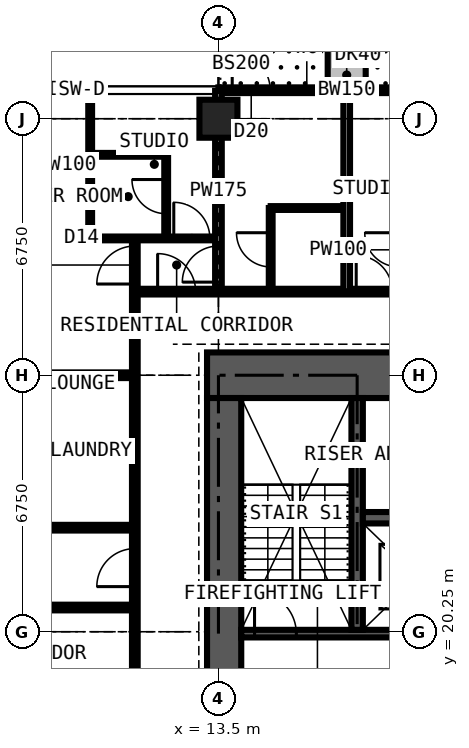
"""IFC4 building model, lengths in metres.
Left out: names, types, materials, properties, quantities, classifications, styles, units other than length and angle.
Written with IfcOpenShell. Run it as: python <this file> out.ifc"""

import sys

from ifc_helpers import new_model, si_unit, direction, frame, frame_2d, origin, origin_2d, place, context, subcontext, project, spatial, rectangle, extrude, element, fill, save


model = new_model("IFC4")
c1 = context("Model", 3, precision=1e-05, world=origin(), true_north=direction((0.0, 1.0)))
c2 = subcontext(c1, "Body", "Model", "MODEL_VIEW")
j1 = project(units=[si_unit("LENGTHUNIT", "METRE"), si_unit("PLANEANGLEUNIT", "RADIAN")], contexts=[c1])
p1 = place(None, origin())
s1 = spatial("IfcSite", under=j1, at=p1, CompositionType="ELEMENT")
p2 = place(p1, origin())
s2 = spatial("IfcBuilding", under=s1, at=p2, CompositionType="ELEMENT")
p3 = place(p2, frame((0.0, 0.0, 233.1)))
s3 = spatial("IfcBuildingStorey", under=s2, at=p3, CompositionType="ELEMENT", Elevation=233.1)
p4 = place(p3, frame((13.5, 33.75, 0.0), z_axis=(0.0, 0.0, 1.0), x_axis=(1.0, 0.0, 0.0)))
e1 = element("IfcColumn", 1, at=p4, inside=s3, PredefinedType="COLUMN", context=c2, shape_type="SweptSolid", body=[
    extrude(rectangle(XDim=1.0, YDim=1.0, at=origin_2d()), origin(), (0.0, 0.0, 1.0), 3.6),
])
p5 = place(p3, frame((27.3, 27.0, 0.0), z_axis=(0.0, 0.0, 1.0), x_axis=(-1.0, 0.0, 0.0)))
e2 = element("IfcWall", 2, at=p5, inside=s3, PredefinedType="SHEAR", context=c2, shape_type="SweptSolid", body=[
    extrude(rectangle(XDim=14.1, YDim=1.2, at=frame_2d((7.05, 0.0))), origin(), (0.0, 0.0, 1.0), 3.6),
])
p6 = place(p5, frame((4.55, 0.0, 0.0)))
e3 = element("IfcOpeningElement", 3, at=p6, cuts=e2, PredefinedType="OPENING", context=c2, shape_type="SweptSolid", body=[
    extrude(rectangle(XDim=0.9, YDim=2.2, at=frame_2d((0.45, 1.1))), frame((0.0, 0.61, 0.0), z_axis=(0.0, -1.0, 0.0), x_axis=(1.0, 0.0, 0.0)), (0.0, 0.0, 1.0), 1.22),
])
p7 = place(p5, frame((7.525, 0.0, 0.0)))
e4 = element("IfcOpeningElement", 4, at=p7, cuts=e2, PredefinedType="OPENING", context=c2, shape_type="SweptSolid", body=[
    extrude(rectangle(XDim=1.0, YDim=2.2, at=frame_2d((0.5, 1.1))), frame((0.0, 0.61, 0.0), z_axis=(0.0, -1.0, 0.0), x_axis=(1.0, 0.0, 0.0)), (0.0, 0.0, 1.0), 1.22),
])
p8 = place(p3, frame((13.65, 26.4, 0.0), z_axis=(0.0, 0.0, 1.0), x_axis=(0.0, -1.0, 0.0)))
e5 = element("IfcWall", 5, at=p8, inside=s3, PredefinedType="SHEAR", context=c2, shape_type="SweptSolid", body=[
    extrude(rectangle(XDim=12.3, YDim=0.9, at=frame_2d((6.15, 0.0))), origin(), (0.0, 0.0, 1.0), 3.6),
])
p9 = place(p8, frame((7.45, 0.0, 0.0)))
e6 = element("IfcOpeningElement", 6, at=p9, cuts=e5, PredefinedType="OPENING", context=c2, shape_type="SweptSolid", body=[
    extrude(rectangle(XDim=1.2, YDim=2.2, at=frame_2d((0.6, 1.1))), frame((0.0, 0.46, 0.0), z_axis=(0.0, -1.0, 0.0), x_axis=(1.0, 0.0, 0.0)), (0.0, 0.0, 1.0), 0.92),
])
p10 = place(p3, frame((13.5, 34.5, 0.0), z_axis=(0.0, 0.0, 1.0), x_axis=(1.0, 0.0, 0.0)))
e7 = element("IfcWall", 7, at=p10, inside=s3, PredefinedType="SOLIDWALL", context=c2, shape_type="SweptSolid", body=[
    extrude(rectangle(XDim=6.75, YDim=0.15, at=frame_2d((3.375, 0.0))), origin(), (0.0, 0.0, 1.0), 3.375),
])
p11 = place(p10, frame((0.363, 0.0, 0.0)))
e8 = element("IfcOpeningElement", 8, at=p11, cuts=e7, PredefinedType="OPENING", context=c2, shape_type="SweptSolid", body=[
    extrude(rectangle(XDim=1.0, YDim=2.2, at=frame_2d((0.5, 1.1))), frame((0.0, 0.085, 0.0), z_axis=(0.0, -1.0, 0.0), x_axis=(1.0, 0.0, 0.0)), (0.0, 0.0, 1.0), 0.17),
])
p12 = place(p10, frame((1.725, 0.0, 0.9)))
e9 = element("IfcOpeningElement", 9, at=p12, cuts=e7, PredefinedType="OPENING", context=c2, shape_type="SweptSolid", body=[
    extrude(rectangle(XDim=1.2, YDim=1.8, at=frame_2d((0.6, 0.9))), frame((0.0, 0.085, 0.0), z_axis=(0.0, -1.0, 0.0), x_axis=(1.0, 0.0, 0.0)), (0.0, 0.0, 1.0), 0.17),
])
p13 = place(p10, frame((5.387, 0.0, 0.0)))
e10 = element("IfcOpeningElement", 10, at=p13, cuts=e7, PredefinedType="OPENING", context=c2, shape_type="SweptSolid", body=[
    extrude(rectangle(XDim=1.0, YDim=2.2, at=frame_2d((0.5, 1.1))), frame((0.0, 0.085, 0.0), z_axis=(0.0, -1.0, 0.0), x_axis=(1.0, 0.0, 0.0)), (0.0, 0.0, 1.0), 0.17),
])
p14 = place(p10, frame((3.825, 0.0, 0.9)))
e11 = element("IfcOpeningElement", 11, at=p14, cuts=e7, PredefinedType="OPENING", context=c2, shape_type="SweptSolid", body=[
    extrude(rectangle(XDim=1.2, YDim=1.8, at=frame_2d((0.6, 0.9))), frame((0.0, 0.085, 0.0), z_axis=(0.0, -1.0, 0.0), x_axis=(1.0, 0.0, 0.0)), (0.0, 0.0, 1.0), 0.17),
])
p15 = place(p3, frame((16.875, 34.6, 0.0), z_axis=(0.0, 0.0, 1.0), x_axis=(0.0, 1.0, 0.0)))
e12 = element("IfcWall", 12, at=p15, inside=s3, PredefinedType="USERDEFINED", context=c2, shape_type="SweptSolid", body=[
    extrude(rectangle(XDim=2.2, YDim=1.0, at=frame_2d((1.1, 0.0))), origin(), (0.0, 0.0, 1.0), 0.9),
])
p16 = place(p3, frame((14.1, 20.2, 0.0), z_axis=(0.0, 0.0, 1.0), x_axis=(1.0, 0.0, 0.0)))
e13 = element("IfcWall", 13, at=p16, inside=s3, PredefinedType="SHEAR", context=c2, shape_type="SweptSolid", body=[
    extrude(rectangle(XDim=12.3, YDim=0.2, at=frame_2d((6.15, 0.0))), origin(), (0.0, 0.0, 1.0), 3.6),
])
p17 = place(p16, frame((4.56, 0.0, 0.0)))
e14 = element("IfcOpeningElement", 14, at=p17, cuts=e13, PredefinedType="OPENING", context=c2, shape_type="SweptSolid", body=[
    extrude(rectangle(XDim=1.1, YDim=2.2, at=frame_2d((0.55, 1.1))), frame((0.0, 0.11, 0.0), z_axis=(0.0, -1.0, 0.0), x_axis=(1.0, 0.0, 0.0)), (0.0, 0.0, 1.0), 0.22),
])
p18 = place(p16, frame((6.7, 0.0, 0.0)))
e15 = element("IfcOpeningElement", 15, at=p18, cuts=e13, PredefinedType="OPENING", context=c2, shape_type="SweptSolid", body=[
    extrude(rectangle(XDim=1.1, YDim=2.2, at=frame_2d((0.55, 1.1))), frame((0.0, 0.11, 0.0), z_axis=(0.0, -1.0, 0.0), x_axis=(1.0, 0.0, 0.0)), (0.0, 0.0, 1.0), 0.22),
])
p19 = place(p16, frame((0.35, 0.0, 0.0)))
e16 = element("IfcOpeningElement", 16, at=p19, cuts=e13, PredefinedType="OPENING", context=c2, shape_type="SweptSolid", body=[
    extrude(rectangle(XDim=1.1, YDim=2.2, at=frame_2d((0.55, 1.1))), frame((0.0, 0.11, 0.0), z_axis=(0.0, -1.0, 0.0), x_axis=(1.0, 0.0, 0.0)), (0.0, 0.0, 1.0), 0.22),
])
p20 = place(p16, frame((9.75, 0.0, 0.0)))
e17 = element("IfcOpeningElement", 17, at=p20, cuts=e13, PredefinedType="OPENING", context=c2, shape_type="SweptSolid", body=[
    extrude(rectangle(XDim=1.1, YDim=2.2, at=frame_2d((0.55, 1.1))), frame((0.0, 0.11, 0.0), z_axis=(0.0, -1.0, 0.0), x_axis=(1.0, 0.0, 0.0)), (0.0, 0.0, 1.0), 0.22),
])
p21 = place(p3, frame((17.15, 20.3, 0.0), z_axis=(0.0, 0.0, 1.0), x_axis=(0.0, 1.0, 0.0)))
e18 = element("IfcWall", 18, at=p21, inside=s3, PredefinedType="SHEAR", context=c2, shape_type="SweptSolid", body=[
    extrude(rectangle(XDim=6.1, YDim=0.3, at=frame_2d((3.05, 0.0))), origin(), (0.0, 0.0, 1.0), 3.6),
])
p22 = place(p3, frame((17.3, 23.25, 0.0), z_axis=(0.0, 0.0, 1.0), x_axis=(1.0, 0.0, 0.0)))
e19 = element("IfcWall", 19, at=p22, inside=s3, PredefinedType="SHEAR", context=c2, shape_type="SweptSolid", body=[
    extrude(rectangle(XDim=5.9, YDim=0.3, at=frame_2d((2.95, 0.0))), origin(), (0.0, 0.0, 1.0), 3.6),
])
p23 = place(p3, frame((4.15, 27.0, 0.0), z_axis=(0.0, 0.0, 1.0), x_axis=(1.0, 0.0, 0.0)))
e20 = element("IfcWall", 20, at=p23, inside=s3, PredefinedType="PARTITIONING", context=c2, shape_type="SweptSolid", body=[
    extrude(rectangle(XDim=7.15, YDim=0.15, at=frame_2d((3.575, 0.0))), origin(), (0.0, 0.0, 1.0), 2.877),
])
p24 = place(p3, frame((5.65, 20.887, 0.0), z_axis=(0.0, 0.0, 1.0), x_axis=(1.0, 0.0, 0.0)))
e21 = element("IfcWall", 21, at=p24, inside=s3, PredefinedType="PARTITIONING", context=c2, shape_type="SweptSolid", body=[
    extrude(rectangle(XDim=5.65, YDim=0.15, at=frame_2d((2.825, 0.0))), origin(), (0.0, 0.0, 1.0), 3.375),
])
p25 = place(p3, frame((5.65, 22.988, 0.0), z_axis=(0.0, 0.0, 1.0), x_axis=(1.0, 0.0, 0.0)))
e22 = element("IfcWall", 22, at=p25, inside=s3, PredefinedType="PARTITIONING", context=c2, shape_type="SweptSolid", body=[
    extrude(rectangle(XDim=5.65, YDim=0.15, at=frame_2d((2.825, 0.0))), origin(), (0.0, 0.0, 1.0), 3.375),
])
p26 = place(p25, frame((2.35, 0.0, 0.0)))
e23 = element("IfcOpeningElement", 23, at=p26, cuts=e22, PredefinedType="OPENING", context=c2, shape_type="SweptSolid", body=[
    extrude(rectangle(XDim=0.95, YDim=2.2, at=frame_2d((0.475, 1.1))), frame((0.0, 0.085, 0.0), z_axis=(0.0, -1.0, 0.0), x_axis=(1.0, 0.0, 0.0)), (0.0, 0.0, 1.0), 0.17),
])
p27 = place(p3, frame((10.125, 30.6, 0.0), z_axis=(0.0, 0.0, 1.0), x_axis=(0.0, 1.0, 0.0)))
e24 = element("IfcWall", 24, at=p27, inside=s3, PredefinedType="PARTITIONING", context=c2, shape_type="SweptSolid", body=[
    extrude(rectangle(XDim=3.884, YDim=0.1, at=frame_2d((1.942, 0.0))), origin(), (0.0, 0.0, 1.0), 3.375),
])
p28 = place(p3, frame((10.125, 30.6, 0.0), z_axis=(0.0, 0.0, 1.0), x_axis=(1.0, 0.0, 0.0)))
e25 = element("IfcWall", 25, at=p28, inside=s3, PredefinedType="PARTITIONING", context=c2, shape_type="SweptSolid", body=[
    extrude(rectangle(XDim=3.375, YDim=0.1, at=frame_2d((1.688, 0.0))), origin(), (0.0, 0.0, 1.0), 3.375),
])
p29 = place(p28, frame((2.2, 0.0, 0.0)))
e26 = element("IfcOpeningElement", 26, at=p29, cuts=e25, PredefinedType="OPENING", context=c2, shape_type="SweptSolid", body=[
    extrude(rectangle(XDim=0.95, YDim=2.2, at=frame_2d((0.475, 1.1))), frame((0.0, 0.06, 0.0), z_axis=(0.0, -1.0, 0.0), x_axis=(1.0, 0.0, 0.0)), (0.0, 0.0, 1.0), 0.12),
])
p30 = place(p3, frame((10.125, 32.8, 0.0), z_axis=(0.0, 0.0, 1.0), x_axis=(1.0, 0.0, 0.0)))
e27 = element("IfcWall", 27, at=p30, inside=s3, PredefinedType="PARTITIONING", context=c2, shape_type="SweptSolid", body=[
    extrude(rectangle(XDim=2.0, YDim=0.1, at=frame_2d((1.0, 0.0))), origin(), (0.0, 0.0, 1.0), 3.375),
])
p31 = place(p3, frame((11.3, 11.3, 0.0), z_axis=(0.0, 0.0, 1.0), x_axis=(0.0, 1.0, 0.0)))
e28 = element("IfcWall", 28, at=p31, inside=s3, PredefinedType="PARTITIONING", context=c2, shape_type="SweptSolid", body=[
    extrude(rectangle(XDim=19.3, YDim=0.15, at=frame_2d((9.65, 0.0))), origin(), (0.0, 0.0, 1.0), 3.375),
])
p32 = place(p31, frame((18.1, 0.0, 0.0)))
e29 = element("IfcOpeningElement", 29, at=p32, cuts=e28, PredefinedType="OPENING", context=c2, shape_type="SweptSolid", body=[
    extrude(rectangle(XDim=1.0, YDim=2.2, at=frame_2d((0.5, 1.1))), frame((0.0, 0.085, 0.0), z_axis=(0.0, -1.0, 0.0), x_axis=(1.0, 0.0, 0.0)), (0.0, 0.0, 1.0), 0.17),
])
p33 = place(p31, frame((10.137, 0.0, 0.0)))
e30 = element("IfcOpeningElement", 30, at=p33, cuts=e28, PredefinedType="OPENING", context=c2, shape_type="SweptSolid", body=[
    extrude(rectangle(XDim=1.0, YDim=2.2, at=frame_2d((0.5, 1.1))), frame((0.0, 0.085, 0.0), z_axis=(0.0, -1.0, 0.0), x_axis=(1.0, 0.0, 0.0)), (0.0, 0.0, 1.0), 0.17),
])
p34 = place(p3, frame((11.3, 29.2, 0.0), z_axis=(0.0, 0.0, 1.0), x_axis=(1.0, 0.0, 0.0)))
e31 = element("IfcWall", 31, at=p34, inside=s3, PredefinedType="PARTITIONING", context=c2, shape_type="SweptSolid", body=[
    extrude(rectangle(XDim=19.809, YDim=0.15, at=frame_2d((9.904, 0.0))), origin(), (0.0, 0.0, 1.0), 3.375),
])
p35 = place(p34, frame((16.3, 0.0, 0.0)))
e32 = element("IfcOpeningElement", 32, at=p35, cuts=e31, PredefinedType="OPENING", context=c2, shape_type="SweptSolid", body=[
    extrude(rectangle(XDim=1.0, YDim=2.2, at=frame_2d((0.5, 1.1))), frame((0.0, 0.085, 0.0), z_axis=(0.0, -1.0, 0.0), x_axis=(1.0, 0.0, 0.0)), (0.0, 0.0, 1.0), 0.17),
])
p36 = place(p34, frame((5.825, 0.0, 0.0)))
e33 = element("IfcOpeningElement", 33, at=p36, cuts=e31, PredefinedType="OPENING", context=c2, shape_type="SweptSolid", body=[
    extrude(rectangle(XDim=0.95, YDim=2.2, at=frame_2d((0.475, 1.1))), frame((0.0, 0.085, 0.0), z_axis=(0.0, -1.0, 0.0), x_axis=(1.0, 0.0, 0.0)), (0.0, 0.0, 1.0), 0.17),
])
p37 = place(p34, frame((9.2, 0.0, 0.0)))
e34 = element("IfcOpeningElement", 34, at=p37, cuts=e31, PredefinedType="OPENING", context=c2, shape_type="SweptSolid", body=[
    extrude(rectangle(XDim=0.95, YDim=2.2, at=frame_2d((0.475, 1.1))), frame((0.0, 0.085, 0.0), z_axis=(0.0, -1.0, 0.0), x_axis=(1.0, 0.0, 0.0)), (0.0, 0.0, 1.0), 0.17),
])
p38 = place(p34, frame((12.575, 0.0, 0.0)))
e35 = element("IfcOpeningElement", 35, at=p38, cuts=e31, PredefinedType="OPENING", context=c2, shape_type="SweptSolid", body=[
    extrude(rectangle(XDim=0.95, YDim=2.2, at=frame_2d((0.475, 1.1))), frame((0.0, 0.085, 0.0), z_axis=(0.0, -1.0, 0.0), x_axis=(1.0, 0.0, 0.0)), (0.0, 0.0, 1.0), 0.17),
])
p39 = place(p34, frame((0.6, 0.0, 0.0)))
e36 = element("IfcOpeningElement", 36, at=p39, cuts=e31, PredefinedType="OPENING", context=c2, shape_type="SweptSolid", body=[
    extrude(rectangle(XDim=1.0, YDim=2.2, at=frame_2d((0.5, 1.1))), frame((0.0, 0.085, 0.0), z_axis=(0.0, -1.0, 0.0), x_axis=(1.0, 0.0, 0.0)), (0.0, 0.0, 1.0), 0.17),
])
p40 = place(p3, frame((12.125, 30.6, 0.0), z_axis=(0.0, 0.0, 1.0), x_axis=(0.0, 1.0, 0.0)))
e37 = element("IfcWall", 37, at=p40, inside=s3, PredefinedType="PARTITIONING", context=c2, shape_type="SweptSolid", body=[
    extrude(rectangle(XDim=2.2, YDim=0.1, at=frame_2d((1.1, 0.0))), origin(), (0.0, 0.0, 1.0), 3.375),
])
p41 = place(p40, frame((0.65, 0.0, 0.0)))
e38 = element("IfcOpeningElement", 38, at=p41, cuts=e37, PredefinedType="OPENING", context=c2, shape_type="SweptSolid", body=[
    extrude(rectangle(XDim=0.9, YDim=2.2, at=frame_2d((0.45, 1.1))), frame((0.0, 0.06, 0.0), z_axis=(0.0, -1.0, 0.0), x_axis=(1.0, 0.0, 0.0)), (0.0, 0.0, 1.0), 0.12),
])
p42 = place(p3, frame((13.5, 29.2, 0.0), z_axis=(0.0, 0.0, 1.0), x_axis=(0.0, 1.0, 0.0)))
e39 = element("IfcWall", 39, at=p42, inside=s3, PredefinedType="PARTITIONING", context=c2, shape_type="SweptSolid", body=[
    extrude(rectangle(XDim=5.284, YDim=0.175, at=frame_2d((2.642, 0.0))), origin(), (0.0, 0.0, 1.0), 2.877),
])
p43 = place(p42, frame((0.25, 0.0, 0.0)))
e40 = element("IfcOpeningElement", 40, at=p43, cuts=e39, PredefinedType="OPENING", context=c2, shape_type="SweptSolid", body=[
    extrude(rectangle(XDim=0.95, YDim=2.2, at=frame_2d((0.475, 1.1))), frame((0.0, 0.097, 0.0), z_axis=(0.0, -1.0, 0.0), x_axis=(1.0, 0.0, 0.0)), (0.0, 0.0, 1.0), 0.195),
])
p44 = place(p3, frame((14.875, 29.2, 0.0), z_axis=(0.0, 0.0, 1.0), x_axis=(0.0, 1.0, 0.0)))
e41 = element("IfcWall", 41, at=p44, inside=s3, PredefinedType="PARTITIONING", context=c2, shape_type="SweptSolid", body=[
    extrude(rectangle(XDim=2.2, YDim=0.1, at=frame_2d((1.1, 0.0))), origin(), (0.0, 0.0, 1.0), 3.375),
])
p45 = place(p44, frame((0.65, 0.0, 0.0)))
e42 = element("IfcOpeningElement", 42, at=p45, cuts=e41, PredefinedType="OPENING", context=c2, shape_type="SweptSolid", body=[
    extrude(rectangle(XDim=0.9, YDim=2.2, at=frame_2d((0.45, 1.1))), frame((0.0, 0.06, 0.0), z_axis=(0.0, -1.0, 0.0), x_axis=(1.0, 0.0, 0.0)), (0.0, 0.0, 1.0), 0.12),
])
p46 = place(p3, frame((14.875, 31.4, 0.0), z_axis=(0.0, 0.0, 1.0), x_axis=(1.0, 0.0, 0.0)))
e43 = element("IfcWall", 43, at=p46, inside=s3, PredefinedType="PARTITIONING", context=c2, shape_type="SweptSolid", body=[
    extrude(rectangle(XDim=2.0, YDim=0.1, at=frame_2d((1.0, 0.0))), origin(), (0.0, 0.0, 1.0), 3.375),
])
p47 = place(p3, frame((16.875, 29.2, 0.0), z_axis=(0.0, 0.0, 1.0), x_axis=(0.0, 1.0, 0.0)))
e44 = element("IfcWall", 44, at=p47, inside=s3, PredefinedType="PARTITIONING", context=c2, shape_type="SweptSolid", body=[
    extrude(rectangle(XDim=5.284, YDim=0.175, at=frame_2d((2.642, 0.0))), origin(), (0.0, 0.0, 1.0), 3.375),
])
p48 = place(p11, origin())
e45 = element("IfcDoor", 45, at=p48, inside=s3, OperationType="SINGLE_SWING_LEFT", PredefinedType="DOOR", context=c2, shape_type="SweptSolid", body=[
    extrude(rectangle(XDim=1.0, YDim=2.2, at=frame_2d((0.5, 1.1))), frame((0.0, 0.025, 0.0), z_axis=(0.0, -1.0, 0.0), x_axis=(1.0, 0.0, 0.0)), (0.0, 0.0, 1.0), 0.05),
])
fill(e8, e45)
p49 = place(p12, origin())
e46 = element("IfcWindow", 46, at=p49, inside=s3, PartitioningType="SINGLE_PANEL", PredefinedType="WINDOW", context=c2, shape_type="SweptSolid", body=[
    extrude(rectangle(XDim=1.2, YDim=1.8, at=frame_2d((0.6, 0.9))), frame((0.0, 0.03, 0.0), z_axis=(0.0, -1.0, 0.0), x_axis=(1.0, 0.0, 0.0)), (0.0, 0.0, 1.0), 0.06),
])
fill(e9, e46)
p50 = place(p14, origin())
e47 = element("IfcWindow", 47, at=p50, inside=s3, PartitioningType="SINGLE_PANEL", PredefinedType="WINDOW", context=c2, shape_type="SweptSolid", body=[
    extrude(rectangle(XDim=1.2, YDim=1.8, at=frame_2d((0.6, 0.9))), frame((0.0, 0.03, 0.0), z_axis=(0.0, -1.0, 0.0), x_axis=(1.0, 0.0, 0.0)), (0.0, 0.0, 1.0), 0.06),
])
fill(e11, e47)
p51 = place(p19, origin())
e48 = element("IfcDoor", 48, at=p51, inside=s3, OperationType="SINGLE_SWING_LEFT", PredefinedType="DOOR", context=c2, shape_type="SweptSolid", body=[
    extrude(rectangle(XDim=1.1, YDim=2.2, at=frame_2d((0.55, 1.1))), frame((0.0, 0.025, 0.0), z_axis=(0.0, -1.0, 0.0), x_axis=(1.0, 0.0, 0.0)), (0.0, 0.0, 1.0), 0.05),
])
fill(e16, e48)
p52 = place(p29, origin())
e49 = element("IfcDoor", 49, at=p52, inside=s3, OperationType="SINGLE_SWING_LEFT", PredefinedType="DOOR", context=c2, shape_type="SweptSolid", body=[
    extrude(rectangle(XDim=0.95, YDim=2.2, at=frame_2d((0.475, 1.1))), frame((0.0, 0.025, 0.0), z_axis=(0.0, -1.0, 0.0), x_axis=(1.0, 0.0, 0.0)), (0.0, 0.0, 1.0), 0.05),
])
fill(e26, e49)
p53 = place(p41, origin())
e50 = element("IfcDoor", 50, at=p53, inside=s3, OperationType="SINGLE_SWING_RIGHT", PredefinedType="DOOR", context=c2, shape_type="SweptSolid", body=[
    extrude(rectangle(XDim=0.9, YDim=2.2, at=frame_2d((0.45, 1.1))), frame((0.0, 0.025, 0.0), z_axis=(0.0, -1.0, 0.0), x_axis=(1.0, 0.0, 0.0)), (0.0, 0.0, 1.0), 0.05),
])
fill(e38, e50)
p54 = place(p43, origin())
e51 = element("IfcDoor", 51, at=p54, inside=s3, OperationType="SINGLE_SWING_LEFT", PredefinedType="DOOR", context=c2, shape_type="SweptSolid", body=[
    extrude(rectangle(XDim=0.95, YDim=2.2, at=frame_2d((0.475, 1.1))), frame((0.0, 0.025, 0.0), z_axis=(0.0, -1.0, 0.0), x_axis=(1.0, 0.0, 0.0)), (0.0, 0.0, 1.0), 0.05),
])
fill(e40, e51)
p55 = place(p45, origin())
e52 = element("IfcDoor", 52, at=p55, inside=s3, OperationType="SINGLE_SWING_RIGHT", PredefinedType="DOOR", context=c2, shape_type="SweptSolid", body=[
    extrude(rectangle(XDim=0.9, YDim=2.2, at=frame_2d((0.45, 1.1))), frame((0.0, 0.025, 0.0), z_axis=(0.0, -1.0, 0.0), x_axis=(1.0, 0.0, 0.0)), (0.0, 0.0, 1.0), 0.05),
])
fill(e42, e52)
p56 = place(p36, origin())
e53 = element("IfcDoor", 53, at=p56, inside=s3, OperationType="SINGLE_SWING_LEFT", PredefinedType="DOOR", context=c2, shape_type="SweptSolid", body=[
    extrude(rectangle(XDim=0.95, YDim=2.2, at=frame_2d((0.475, 1.1))), frame((0.0, 0.025, 0.0), z_axis=(0.0, -1.0, 0.0), x_axis=(1.0, 0.0, 0.0)), (0.0, 0.0, 1.0), 0.05),
])
fill(e33, e53)
p57 = place(p39, origin())
e54 = element("IfcDoor", 54, at=p57, inside=s3, OperationType="SINGLE_SWING_LEFT", PredefinedType="DOOR", context=c2, shape_type="SweptSolid", body=[
    extrude(rectangle(XDim=1.0, YDim=2.2, at=frame_2d((0.5, 1.1))), frame((0.0, 0.025, 0.0), z_axis=(0.0, -1.0, 0.0), x_axis=(1.0, 0.0, 0.0)), (0.0, 0.0, 1.0), 0.05),
])
fill(e36, e54)
p58 = place(p32, origin())
e55 = element("IfcDoor", 55, at=p58, inside=s3, OperationType="SINGLE_SWING_LEFT", PredefinedType="DOOR", context=c2, shape_type="SweptSolid", body=[
    extrude(rectangle(XDim=1.0, YDim=2.2, at=frame_2d((0.5, 1.1))), frame((0.0, 0.025, 0.0), z_axis=(0.0, -1.0, 0.0), x_axis=(1.0, 0.0, 0.0)), (0.0, 0.0, 1.0), 0.05),
])
fill(e29, e55)
p59 = place(p33, origin())
e56 = element("IfcDoor", 56, at=p59, inside=s3, OperationType="SINGLE_SWING_LEFT", PredefinedType="DOOR", context=c2, shape_type="SweptSolid", body=[
    extrude(rectangle(XDim=1.0, YDim=2.2, at=frame_2d((0.5, 1.1))), frame((0.0, 0.025, 0.0), z_axis=(0.0, -1.0, 0.0), x_axis=(1.0, 0.0, 0.0)), (0.0, 0.0, 1.0), 0.05),
])
fill(e30, e56)
save(model, sys.argv[1])
